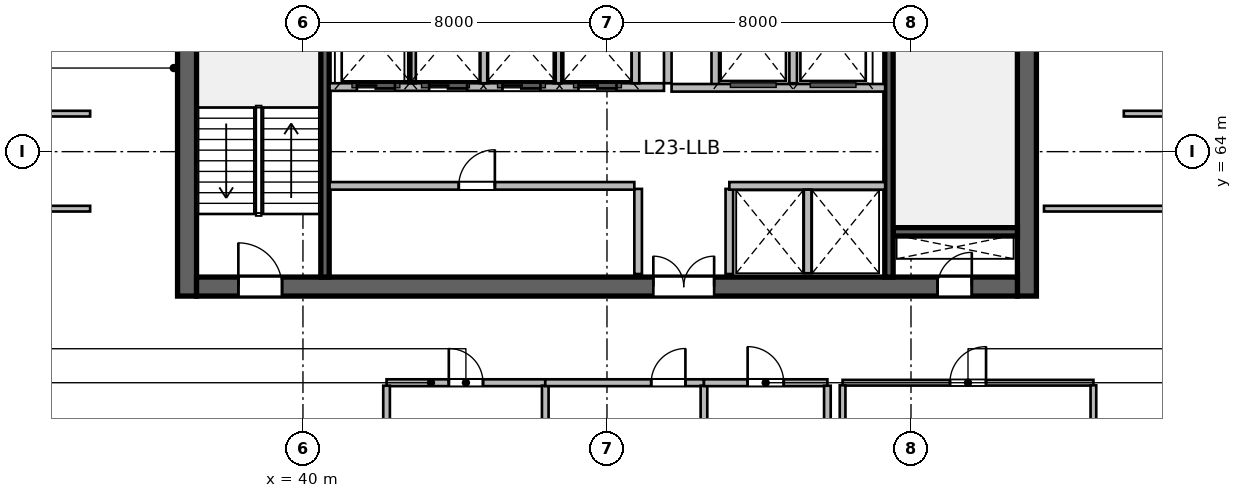
"""IFC4 building model, lengths in metres.
Left out: names, types, materials, properties, quantities, classifications, styles, units other than length and angle.
Written with IfcOpenShell. Run it as: python <this file> out.ifc"""

import sys

from ifc_helpers import new_model, si_unit, direction, frame, frame_2d, origin, place, context, subcontext, project, spatial, rectangle, extrude, source, transform, mapped, element, fill, save


model = new_model("IFC4")
c1 = context("Model", 3, precision=1e-05, world=origin(), true_north=direction((0.0, 1.0)))
c2 = subcontext(c1, "Body", "Model", "MODEL_VIEW")
j1 = project(units=[si_unit("LENGTHUNIT", "METRE"), si_unit("PLANEANGLEUNIT", "RADIAN")], contexts=[c1])
p1 = place(None, origin())
s1 = spatial("IfcSite", under=j1, at=p1, CompositionType="ELEMENT")
p2 = place(p1, origin())
s2 = spatial("IfcBuilding", under=s1, at=p2, CompositionType="ELEMENT")
p3 = place(p2, frame((0.0, 0.0, 99.9)))
s3 = spatial("IfcBuildingStorey", under=s2, at=p3, CompositionType="ELEMENT", Elevation=99.9)
m1 = source(origin(), c2, "Body", "SweptSolid", [
    extrude(rectangle(XDim=12.0, YDim=0.5, at=frame_2d((6.0, 0.0))), origin(), (0.0, 0.0, 1.0), 3.9),
])
for number, where, z_axis, x_axis in (
    (1, (36.95, 60.2, 0.0), (0.0, 0.0, 1.0), (0.0, 1.0, 0.0)),
    (2, (59.05, 60.2, 0.0), (0.0, 0.0, 1.0), (0.0, 1.0, 0.0)),
):
    element("IfcWall", number, at=place(p3, frame(where, z_axis=z_axis, x_axis=x_axis)), inside=s3, PredefinedType="SHEAR", context=c2, shape_type="MappedRepresentation", body=[
        mapped(m1, transform((0.0, 0.0, 0.0), scale=1.0)),
    ])
m2 = source(origin(), c2, "Body", "SweptSolid", [
    extrude(rectangle(XDim=21.6, YDim=0.5, at=frame_2d((10.8, 0.0))), origin(), (0.0, 0.0, 1.0), 3.9),
])
p4 = place(p3, frame((37.2, 60.45, 0.0), z_axis=(0.0, 0.0, 1.0), x_axis=(1.0, 0.0, 0.0)))
e3 = element("IfcWall", 3, at=p4, inside=s3, PredefinedType="SHEAR", context=c2, shape_type="MappedRepresentation", body=[
    mapped(m2, transform((0.0, 0.0, 0.0), scale=1.0)),
])
p5 = place(p4, frame((1.1, 0.0, 0.0)))
e4 = element("IfcOpeningElement", 4, at=p5, cuts=e3, PredefinedType="OPENING", context=c2, shape_type="SweptSolid", body=[
    extrude(rectangle(XDim=1.15, YDim=2.15, at=frame_2d((0.575, 1.075))), frame((0.0, 0.26, 0.0), z_axis=(0.0, -1.0, 0.0), x_axis=(1.0, 0.0, 0.0)), (0.0, 0.0, 1.0), 0.52),
])
p6 = place(p4, frame((19.5, 0.0, 0.0)))
e5 = element("IfcOpeningElement", 5, at=p6, cuts=e3, PredefinedType="OPENING", context=c2, shape_type="SweptSolid", body=[
    extrude(rectangle(XDim=0.9, YDim=2.1, at=frame_2d((0.45, 1.05))), frame((0.0, 0.26, 0.0), z_axis=(0.0, -1.0, 0.0), x_axis=(1.0, 0.0, 0.0)), (0.0, 0.0, 1.0), 0.52),
])
p7 = place(p4, frame((12.02, 0.0, 0.0)))
e6 = element("IfcOpeningElement", 6, at=p7, cuts=e3, PredefinedType="OPENING", context=c2, shape_type="SweptSolid", body=[
    extrude(rectangle(XDim=1.6, YDim=2.15, at=frame_2d((0.8, 1.075))), frame((0.0, 0.26, 0.0), z_axis=(0.0, -1.0, 0.0), x_axis=(1.0, 0.0, 0.0)), (0.0, 0.0, 1.0), 0.52),
])
m3 = source(origin(), c2, "Body", "SweptSolid", [
    extrude(rectangle(XDim=3.27, YDim=0.22, at=frame_2d((1.635, 0.0))), origin(), (0.0, 0.0, 1.0), 3.9),
])
p8 = place(p3, frame((55.53, 61.89, 0.0), z_axis=(0.0, 0.0, 1.0), x_axis=(1.0, 0.0, 0.0)))
e7 = element("IfcWall", 7, at=p8, inside=s3, PredefinedType="SHEAR", context=c2, shape_type="MappedRepresentation", body=[
    mapped(m3, transform((0.0, 0.0, 0.0), scale=1.0)),
])
m4 = source(origin(), c2, "Body", "SweptSolid", [
    extrude(rectangle(XDim=11.0, YDim=0.22, at=frame_2d((5.5, 0.0))), origin(), (0.0, 0.0, 1.0), 3.9),
])
p9 = place(p3, frame((40.58, 60.7, 0.0), z_axis=(0.0, 0.0, 1.0), x_axis=(0.0, 1.0, 0.0)))
e8 = element("IfcWall", 8, at=p9, inside=s3, PredefinedType="SHEAR", context=c2, shape_type="MappedRepresentation", body=[
    mapped(m4, transform((0.0, 0.0, 0.0), scale=1.0)),
])
p10 = place(p3, frame((55.42, 60.7, 0.0), z_axis=(0.0, 0.0, 1.0), x_axis=(0.0, 1.0, 0.0)))
e9 = element("IfcWall", 9, at=p10, inside=s3, PredefinedType="SHEAR", context=c2, shape_type="MappedRepresentation", body=[
    mapped(m4, transform((0.0, 0.0, 0.0), scale=1.0)),
])
p11 = place(p10, frame((9.545, 0.0, 0.0)))
e10 = element("IfcOpeningElement", 10, at=p11, cuts=e9, PredefinedType="OPENING", context=c2, shape_type="SweptSolid", body=[
    extrude(rectangle(XDim=1.15, YDim=2.15, at=frame_2d((0.575, 1.075))), frame((0.0, 0.12, 0.0), z_axis=(0.0, -1.0, 0.0), x_axis=(1.0, 0.0, 0.0)), (0.0, 0.0, 1.0), 0.24),
])
m5 = source(origin(), c2, "Body", "SweptSolid", [
    extrude(rectangle(XDim=2.24, YDim=0.2, at=frame_2d((1.12, 0.0))), origin(), (0.0, 0.0, 1.0), 3.65),
])
for number, where, z_axis, x_axis in (
    (11, (48.82, 60.78, 0.0), (0.0, 0.0, 1.0), (0.0, 1.0, 0.0)),
    (12, (51.22, 60.78, 0.0), (0.0, 0.0, 1.0), (0.0, 1.0, 0.0)),
):
    element("IfcWall", number, at=place(p3, frame(where, z_axis=z_axis, x_axis=x_axis)), inside=s3, PredefinedType="SOLIDWALL", context=c2, shape_type="MappedRepresentation", body=[
        mapped(m5, transform((0.0, 0.0, 0.0), scale=1.0)),
    ])
m6 = source(origin(), c2, "Body", "SweptSolid", [
    extrude(rectangle(XDim=5.8, YDim=0.2, at=frame_2d((2.9, 0.0))), origin(), (0.0, 0.0, 1.0), 3.65),
])
p12 = place(p3, frame((49.6, 65.8, 0.0), z_axis=(0.0, 0.0, 1.0), x_axis=(0.0, 1.0, 0.0)))
e13 = element("IfcWall", 13, at=p12, inside=s3, PredefinedType="SOLIDWALL", context=c2, shape_type="MappedRepresentation", body=[
    mapped(m6, transform((0.0, 0.0, 0.0), scale=1.0)),
])
m7 = source(origin(), c2, "Body", "SweptSolid", [
    extrude(rectangle(XDim=2.58, YDim=0.2, at=frame_2d((1.29, 0.0))), origin(), (0.0, 0.0, 1.0), 3.65),
])
p13 = place(p3, frame((50.85, 65.68, 0.0), z_axis=(0.0, 0.0, 1.0), x_axis=(0.0, 1.0, 0.0)))
e14 = element("IfcWall", 14, at=p13, inside=s3, PredefinedType="SOLIDWALL", context=c2, shape_type="MappedRepresentation", body=[
    mapped(m7, transform((0.0, 0.0, 0.0), scale=1.0)),
])
m8 = source(origin(), c2, "Body", "SweptSolid", [
    extrude(rectangle(XDim=2.4, YDim=0.2, at=frame_2d((1.2, 0.0))), origin(), (0.0, 0.0, 1.0), 3.65),
])
p14 = place(p3, frame((52.9, 65.8, 0.0), z_axis=(0.0, 0.0, 1.0), x_axis=(0.0, 1.0, 0.0)))
e15 = element("IfcWall", 15, at=p14, inside=s3, PredefinedType="SOLIDWALL", context=c2, shape_type="MappedRepresentation", body=[
    mapped(m8, transform((0.0, 0.0, 0.0), scale=1.0)),
])
m9 = source(origin(), c2, "Body", "SweptSolid", [
    extrude(rectangle(XDim=5.62, YDim=0.2, at=frame_2d((2.81, 0.0))), origin(), (0.0, 0.0, 1.0), 3.65),
])
p15 = place(p3, frame((49.7, 65.68, 0.0), z_axis=(0.0, 0.0, 1.0), x_axis=(1.0, 0.0, 0.0)))
e16 = element("IfcWall", 16, at=p15, inside=s3, PredefinedType="SOLIDWALL", context=c2, shape_type="MappedRepresentation", body=[
    mapped(m9, transform((0.0, 0.0, 0.0), scale=1.0)),
])
m10 = source(origin(), c2, "Body", "SweptSolid", [
    extrude(rectangle(XDim=8.02, YDim=0.2, at=frame_2d((4.01, 0.0))), origin(), (0.0, 0.0, 1.0), 3.65),
])
p16 = place(p3, frame((40.7, 63.1, 0.0), z_axis=(0.0, 0.0, 1.0), x_axis=(1.0, 0.0, 0.0)))
e17 = element("IfcWall", 17, at=p16, inside=s3, PredefinedType="SOLIDWALL", context=c2, shape_type="MappedRepresentation", body=[
    mapped(m10, transform((0.0, 0.0, 0.0), scale=1.0)),
])
p17 = place(p16, frame((3.4, 0.0, 0.0)))
e18 = element("IfcOpeningElement", 18, at=p17, cuts=e17, PredefinedType="OPENING", context=c2, shape_type="SweptSolid", body=[
    extrude(rectangle(XDim=0.95, YDim=2.15, at=frame_2d((0.475, 1.075))), frame((0.0, 0.11, 0.0), z_axis=(0.0, -1.0, 0.0), x_axis=(1.0, 0.0, 0.0)), (0.0, 0.0, 1.0), 0.22),
])
m11 = source(origin(), c2, "Body", "SweptSolid", [
    extrude(rectangle(XDim=4.1, YDim=0.2, at=frame_2d((2.05, 0.0))), origin(), (0.0, 0.0, 1.0), 3.65),
])
p18 = place(p3, frame((51.22, 63.1, 0.0), z_axis=(0.0, 0.0, 1.0), x_axis=(1.0, 0.0, 0.0)))
e19 = element("IfcWall", 19, at=p18, inside=s3, PredefinedType="SOLIDWALL", context=c2, shape_type="MappedRepresentation", body=[
    mapped(m11, transform((0.0, 0.0, 0.0), scale=1.0)),
])
m12 = source(origin(), c2, "Body", "SweptSolid", [
    extrude(rectangle(XDim=2.2, YDim=0.2, at=frame_2d((1.1, 0.0))), origin(), (0.0, 0.0, 1.0), 3.65),
])
p19 = place(p3, frame((53.28, 60.8, 0.0), z_axis=(0.0, 0.0, 1.0), x_axis=(0.0, 1.0, 0.0)))
e20 = element("IfcWall", 20, at=p19, inside=s3, PredefinedType="SOLIDWALL", context=c2, shape_type="MappedRepresentation", body=[
    mapped(m12, transform((0.0, 0.0, 0.0), scale=1.0)),
])
m13 = source(origin(), c2, "Body", "SweptSolid", [
    extrude(rectangle(XDim=8.8, YDim=0.2, at=frame_2d((4.4, 0.0))), origin(), (0.0, 0.0, 1.0), 3.65),
])
p20 = place(p3, frame((40.7, 65.7, 0.0), z_axis=(0.0, 0.0, 1.0), x_axis=(1.0, 0.0, 0.0)))
e21 = element("IfcWall", 21, at=p20, inside=s3, PredefinedType="SOLIDWALL", context=c2, shape_type="MappedRepresentation", body=[
    mapped(m13, transform((0.0, 0.0, 0.0), scale=1.0)),
])
p21 = place(p20, frame((0.72, 0.0, 0.0)))
e22 = element("IfcOpeningElement", 22, at=p21, cuts=e21, PredefinedType="OPENING", context=c2, shape_type="SweptSolid", body=[
    extrude(rectangle(XDim=1.0, YDim=2.15, at=frame_2d((0.5, 1.075))), frame((0.0, 0.11, 0.0), z_axis=(0.0, -1.0, 0.0), x_axis=(1.0, 0.0, 0.0)), (0.0, 0.0, 1.0), 0.22),
])
p22 = place(p20, frame((2.62, 0.0, 0.0)))
e23 = element("IfcOpeningElement", 23, at=p22, cuts=e21, PredefinedType="OPENING", context=c2, shape_type="SweptSolid", body=[
    extrude(rectangle(XDim=1.0, YDim=2.15, at=frame_2d((0.5, 1.075))), frame((0.0, 0.11, 0.0), z_axis=(0.0, -1.0, 0.0), x_axis=(1.0, 0.0, 0.0)), (0.0, 0.0, 1.0), 0.22),
])
p23 = place(p20, frame((4.55, 0.0, 0.0)))
e24 = element("IfcOpeningElement", 24, at=p23, cuts=e21, PredefinedType="OPENING", context=c2, shape_type="SweptSolid", body=[
    extrude(rectangle(XDim=1.0, YDim=2.15, at=frame_2d((0.5, 1.075))), frame((0.0, 0.11, 0.0), z_axis=(0.0, -1.0, 0.0), x_axis=(1.0, 0.0, 0.0)), (0.0, 0.0, 1.0), 0.22),
])
p24 = place(p20, frame((6.55, 0.0, 0.0)))
e25 = element("IfcOpeningElement", 25, at=p24, cuts=e21, PredefinedType="OPENING", context=c2, shape_type="SweptSolid", body=[
    extrude(rectangle(XDim=1.0, YDim=2.15, at=frame_2d((0.5, 1.075))), frame((0.0, 0.11, 0.0), z_axis=(0.0, -1.0, 0.0), x_axis=(1.0, 0.0, 0.0)), (0.0, 0.0, 1.0), 0.22),
])
for number, where, z_axis, x_axis in (
    (26, (48.75, 65.8, 0.0), (0.0, 0.0, 1.0), (0.0, 1.0, 0.0)),
    (27, (42.87, 65.8, 0.0), (0.0, 0.0, 1.0), (0.0, 1.0, 0.0)),
    (28, (44.77, 65.8, 0.0), (0.0, 0.0, 1.0), (0.0, 1.0, 0.0)),
    (29, (46.7, 65.8, 0.0), (0.0, 0.0, 1.0), (0.0, 1.0, 0.0)),
):
    element("IfcWall", number, at=place(p3, frame(where, z_axis=z_axis, x_axis=x_axis)), inside=s3, PredefinedType="SOLIDWALL", context=c2, shape_type="MappedRepresentation", body=[
        mapped(m8, transform((0.0, 0.0, 0.0), scale=1.0)),
    ])
m14 = source(origin(), c2, "Body", "SweptSolid", [
    extrude(rectangle(XDim=4.176, YDim=0.18, at=frame_2d((2.088, 0.0))), origin(), (0.0, 0.0, 1.0), 3.65),
])
p25 = place(p3, frame((42.2, 57.92, 0.0), z_axis=(0.0, 0.0, 1.0), x_axis=(1.0, 0.0, 0.0)))
e30 = element("IfcWall", 30, at=p25, inside=s3, PredefinedType="PLUMBINGWALL", context=c2, shape_type="MappedRepresentation", body=[
    mapped(m14, transform((0.0, 0.0, 0.0), scale=1.0)),
])
p26 = place(p25, frame((1.638, 0.0, 0.0)))
e31 = element("IfcOpeningElement", 31, at=p26, cuts=e30, PredefinedType="OPENING", context=c2, shape_type="SweptSolid", body=[
    extrude(rectangle(XDim=0.9, YDim=2.08, at=frame_2d((0.45, 1.04))), frame((0.0, 0.1, 0.0), z_axis=(0.0, -1.0, 0.0), x_axis=(1.0, 0.0, 0.0)), (0.0, 0.0, 1.0), 0.2),
])
m15 = source(origin(), c2, "Body", "SweptSolid", [
    extrude(rectangle(XDim=3.763, YDim=0.175, at=frame_2d((1.881, 0.0))), origin(), (0.0, 0.0, 1.0), 3.65),
])
for number, where, z_axis, x_axis in (
    (32, (42.2, 54.079, 0.0), (0.0, 0.0, 1.0), (0.0, 1.0, 0.0)),
    (33, (46.376, 54.079, 0.0), (0.0, 0.0, 1.0), (0.0, 1.0, 0.0)),
):
    element("IfcWall", number, at=place(p3, frame(where, z_axis=z_axis, x_axis=x_axis)), inside=s3, PredefinedType="PARTITIONING", context=c2, shape_type="MappedRepresentation", body=[
        mapped(m15, transform((0.0, 0.0, 0.0), scale=1.0)),
    ])
p27 = place(p3, frame((46.376, 57.92, 0.0), z_axis=(0.0, 0.0, 1.0), x_axis=(1.0, 0.0, 0.0)))
e34 = element("IfcWall", 34, at=p27, inside=s3, PredefinedType="PLUMBINGWALL", context=c2, shape_type="MappedRepresentation", body=[
    mapped(m14, transform((0.0, 0.0, 0.0), scale=1.0)),
])
p28 = place(p27, frame((2.788, 0.0, 0.0)))
e35 = element("IfcOpeningElement", 35, at=p28, cuts=e34, PredefinedType="OPENING", context=c2, shape_type="SweptSolid", body=[
    extrude(rectangle(XDim=0.9, YDim=2.08, at=frame_2d((0.45, 1.04))), frame((0.0, 0.1, 0.0), z_axis=(0.0, -1.0, 0.0), x_axis=(1.0, 0.0, 0.0)), (0.0, 0.0, 1.0), 0.2),
])
p29 = place(p3, frame((50.552, 54.079, 0.0), z_axis=(0.0, 0.0, 1.0), x_axis=(0.0, 1.0, 0.0)))
e36 = element("IfcWall", 36, at=p29, inside=s3, PredefinedType="PARTITIONING", context=c2, shape_type="MappedRepresentation", body=[
    mapped(m15, transform((0.0, 0.0, 0.0), scale=1.0)),
])
m16 = source(origin(), c2, "Body", "SweptSolid", [
    extrude(rectangle(XDim=3.248, YDim=0.18, at=frame_2d((1.624, 0.0))), origin(), (0.0, 0.0, 1.0), 3.65),
])
p30 = place(p3, frame((50.552, 57.92, 0.0), z_axis=(0.0, 0.0, 1.0), x_axis=(1.0, 0.0, 0.0)))
e37 = element("IfcWall", 37, at=p30, inside=s3, PredefinedType="PLUMBINGWALL", context=c2, shape_type="MappedRepresentation", body=[
    mapped(m16, transform((0.0, 0.0, 0.0), scale=1.0)),
])
p31 = place(p30, frame((1.149, 0.0, 0.0)))
e38 = element("IfcOpeningElement", 38, at=p31, cuts=e37, PredefinedType="OPENING", context=c2, shape_type="SweptSolid", body=[
    extrude(rectangle(XDim=0.95, YDim=2.12, at=frame_2d((0.475, 1.06))), frame((0.0, 0.1, 0.0), z_axis=(0.0, -1.0, 0.0), x_axis=(1.0, 0.0, 0.0)), (0.0, 0.0, 1.0), 0.2),
])
p32 = place(p3, frame((53.8, 54.079, 0.0), z_axis=(0.0, 0.0, 1.0), x_axis=(0.0, 1.0, 0.0)))
e39 = element("IfcWall", 39, at=p32, inside=s3, PredefinedType="PARTITIONING", context=c2, shape_type="MappedRepresentation", body=[
    mapped(m15, transform((0.0, 0.0, 0.0), scale=1.0)),
])
m17 = source(origin(), c2, "Body", "SweptSolid", [
    extrude(rectangle(XDim=6.6, YDim=0.15, at=frame_2d((3.3, 0.0))), origin(), (0.0, 0.0, 1.0), 3.65),
])
p33 = place(p3, frame((54.2, 57.92, 0.0), z_axis=(0.0, 0.0, 1.0), x_axis=(1.0, 0.0, 0.0)))
e40 = element("IfcWall", 40, at=p33, inside=s3, PredefinedType="PARTITIONING", context=c2, shape_type="MappedRepresentation", body=[
    mapped(m17, transform((0.0, 0.0, 0.0), scale=1.0)),
])
p34 = place(p33, frame((2.825, 0.0, 0.0)))
e41 = element("IfcOpeningElement", 41, at=p34, cuts=e40, PredefinedType="OPENING", context=c2, shape_type="SweptSolid", body=[
    extrude(rectangle(XDim=0.95, YDim=2.1, at=frame_2d((0.475, 1.05))), frame((0.0, 0.085, 0.0), z_axis=(0.0, -1.0, 0.0), x_axis=(1.0, 0.0, 0.0)), (0.0, 0.0, 1.0), 0.17),
])
m18 = source(origin(), c2, "Body", "SweptSolid", [
    extrude(rectangle(XDim=3.785, YDim=0.15, at=frame_2d((1.893, 0.0))), origin(), (0.0, 0.0, 1.0), 3.65),
])
for number, where, z_axis, x_axis in (
    (42, (54.2, 54.067, 0.0), (0.0, 0.0, 1.0), (0.0, 1.0, 0.0)),
    (43, (60.8, 54.067, 0.0), (0.0, 0.0, 1.0), (0.0, 1.0, 0.0)),
):
    element("IfcWall", number, at=place(p3, frame(where, z_axis=z_axis, x_axis=x_axis)), inside=s3, PredefinedType="PARTITIONING", context=c2, shape_type="MappedRepresentation", body=[
        mapped(m18, transform((0.0, 0.0, 0.0), scale=1.0)),
    ])
m19 = source(origin(), c2, "Body", "SweptSolid", [
    extrude(rectangle(XDim=2.66, YDim=0.15, at=frame_2d((1.33, 0.0))), origin(), (0.0, 0.0, 1.0), 3.65),
])
for number, where, z_axis, x_axis in (
    (44, (31.74, 62.5, 0.0), (0.0, 0.0, 1.0), (1.0, 0.0, 0.0)),
    (45, (31.74, 65.0, 0.0), (0.0, 0.0, 1.0), (1.0, 0.0, 0.0)),
):
    element("IfcWall", number, at=place(p3, frame(where, z_axis=z_axis, x_axis=x_axis)), inside=s3, PredefinedType="PARTITIONING", context=c2, shape_type="MappedRepresentation", body=[
        mapped(m19, transform((0.0, 0.0, 0.0), scale=1.0)),
    ])
m20 = source(origin(), c2, "Body", "SweptSolid", [
    extrude(rectangle(XDim=4.76, YDim=0.15, at=frame_2d((2.38, 0.0))), origin(), (0.0, 0.0, 1.0), 3.65),
])
p35 = place(p3, frame((59.5, 62.5, 0.0), z_axis=(0.0, 0.0, 1.0), x_axis=(1.0, 0.0, 0.0)))
e46 = element("IfcWall", 46, at=p35, inside=s3, PredefinedType="PARTITIONING", context=c2, shape_type="MappedRepresentation", body=[
    mapped(m20, transform((0.0, 0.0, 0.0), scale=1.0)),
])
p36 = place(p3, frame((61.6, 65.0, 0.0), z_axis=(0.0, 0.0, 1.0), x_axis=(1.0, 0.0, 0.0)))
e47 = element("IfcWall", 47, at=p36, inside=s3, PredefinedType="PARTITIONING", context=c2, shape_type="MappedRepresentation", body=[
    mapped(m19, transform((0.0, 0.0, 0.0), scale=1.0)),
])
m21 = source(origin(), c2, "Body", "SweptSolid", [
    extrude(rectangle(XDim=1.15, YDim=2.15, at=frame_2d((0.575, 1.075))), frame((0.0, 0.025, 0.0), z_axis=(0.0, -1.0, 0.0), x_axis=(1.0, 0.0, 0.0)), (0.0, 0.0, 1.0), 0.05),
])
p37 = place(p5, origin())
e48 = element("IfcDoor", 48, at=p37, inside=s3, OperationType="SINGLE_SWING_LEFT", PredefinedType="DOOR", context=c2, shape_type="MappedRepresentation", body=[
    mapped(m21, transform((0.0, 0.0, 0.0), scale=1.0)),
])
fill(e4, e48)
m22 = source(origin(), c2, "Body", "SweptSolid", [
    extrude(rectangle(XDim=0.9, YDim=2.1, at=frame_2d((0.45, 1.05))), frame((0.0, 0.025, 0.0), z_axis=(0.0, -1.0, 0.0), x_axis=(1.0, 0.0, 0.0)), (0.0, 0.0, 1.0), 0.05),
])
p38 = place(p6, origin())
e49 = element("IfcDoor", 49, at=p38, inside=s3, OperationType="SINGLE_SWING_RIGHT", PredefinedType="DOOR", context=c2, shape_type="MappedRepresentation", body=[
    mapped(m22, transform((0.0, 0.0, 0.0), scale=1.0)),
])
fill(e5, e49)
m23 = source(origin(), c2, "Body", "SweptSolid", [
    extrude(rectangle(XDim=1.6, YDim=2.15, at=frame_2d((0.8, 1.075))), frame((0.0, 0.025, 0.0), z_axis=(0.0, -1.0, 0.0), x_axis=(1.0, 0.0, 0.0)), (0.0, 0.0, 1.0), 0.05),
])
p39 = place(p7, origin())
e50 = element("IfcDoor", 50, at=p39, inside=s3, OperationType="DOUBLE_DOOR_SINGLE_SWING", PredefinedType="DOOR", context=c2, shape_type="MappedRepresentation", body=[
    mapped(m23, transform((0.0, 0.0, 0.0), scale=1.0)),
])
fill(e6, e50)
m24 = source(origin(), c2, "Body", "SweptSolid", [
    extrude(rectangle(XDim=0.95, YDim=2.15, at=frame_2d((0.475, 1.075))), frame((0.0, 0.025, 0.0), z_axis=(0.0, -1.0, 0.0), x_axis=(1.0, 0.0, 0.0)), (0.0, 0.0, 1.0), 0.05),
])
p40 = place(p17, origin())
e51 = element("IfcDoor", 51, at=p40, inside=s3, OperationType="SINGLE_SWING_RIGHT", PredefinedType="DOOR", context=c2, shape_type="MappedRepresentation", body=[
    mapped(m24, transform((0.0, 0.0, 0.0), scale=1.0)),
])
fill(e18, e51)
m25 = source(origin(), c2, "Body", "SweptSolid", [
    extrude(rectangle(XDim=1.0, YDim=2.15, at=frame_2d((0.5, 1.075))), frame((0.0, 0.025, 0.0), z_axis=(0.0, -1.0, 0.0), x_axis=(1.0, 0.0, 0.0)), (0.0, 0.0, 1.0), 0.05),
])
p41 = place(p21, origin())
e52 = element("IfcDoor", 52, at=p41, inside=s3, OperationType="DOUBLE_DOOR_SLIDING", PredefinedType="DOOR", context=c2, shape_type="MappedRepresentation", body=[
    mapped(m25, transform((0.0, 0.0, 0.0), scale=1.0)),
])
fill(e22, e52)
p42 = place(p22, origin())
e53 = element("IfcDoor", 53, at=p42, inside=s3, OperationType="DOUBLE_DOOR_SLIDING", PredefinedType="DOOR", context=c2, shape_type="MappedRepresentation", body=[
    mapped(m25, transform((0.0, 0.0, 0.0), scale=1.0)),
])
fill(e23, e53)
p43 = place(p23, origin())
e54 = element("IfcDoor", 54, at=p43, inside=s3, OperationType="DOUBLE_DOOR_SLIDING", PredefinedType="DOOR", context=c2, shape_type="MappedRepresentation", body=[
    mapped(m25, transform((0.0, 0.0, 0.0), scale=1.0)),
])
fill(e24, e54)
p44 = place(p24, origin())
e55 = element("IfcDoor", 55, at=p44, inside=s3, OperationType="DOUBLE_DOOR_SLIDING", PredefinedType="DOOR", context=c2, shape_type="MappedRepresentation", body=[
    mapped(m25, transform((0.0, 0.0, 0.0), scale=1.0)),
])
fill(e25, e55)
m26 = source(origin(), c2, "Body", "SweptSolid", [
    extrude(rectangle(XDim=0.9, YDim=2.08, at=frame_2d((0.45, 1.04))), frame((0.0, 0.025, 0.0), z_axis=(0.0, -1.0, 0.0), x_axis=(1.0, 0.0, 0.0)), (0.0, 0.0, 1.0), 0.05),
])
p45 = place(p26, origin())
e56 = element("IfcDoor", 56, at=p45, inside=s3, OperationType="SINGLE_SWING_LEFT", PredefinedType="DOOR", context=c2, shape_type="MappedRepresentation", body=[
    mapped(m26, transform((0.0, 0.0, 0.0), scale=1.0)),
])
fill(e31, e56)
p46 = place(p28, origin())
e57 = element("IfcDoor", 57, at=p46, inside=s3, OperationType="SINGLE_SWING_RIGHT", PredefinedType="DOOR", context=c2, shape_type="MappedRepresentation", body=[
    mapped(m26, transform((0.0, 0.0, 0.0), scale=1.0)),
])
fill(e35, e57)
m27 = source(origin(), c2, "Body", "SweptSolid", [
    extrude(rectangle(XDim=0.95, YDim=2.12, at=frame_2d((0.475, 1.06))), frame((0.0, 0.025, 0.0), z_axis=(0.0, -1.0, 0.0), x_axis=(1.0, 0.0, 0.0)), (0.0, 0.0, 1.0), 0.05),
])
p47 = place(p31, origin())
e58 = element("IfcDoor", 58, at=p47, inside=s3, OperationType="SINGLE_SWING_LEFT", PredefinedType="DOOR", context=c2, shape_type="MappedRepresentation", body=[
    mapped(m27, transform((0.0, 0.0, 0.0), scale=1.0)),
])
fill(e38, e58)
m28 = source(origin(), c2, "Body", "SweptSolid", [
    extrude(rectangle(XDim=0.95, YDim=2.1, at=frame_2d((0.475, 1.05))), frame((0.0, 0.025, 0.0), z_axis=(0.0, -1.0, 0.0), x_axis=(1.0, 0.0, 0.0)), (0.0, 0.0, 1.0), 0.05),
])
p48 = place(p34, origin())
e59 = element("IfcDoor", 59, at=p48, inside=s3, OperationType="SINGLE_SWING_RIGHT", PredefinedType="DOOR", context=c2, shape_type="MappedRepresentation", body=[
    mapped(m28, transform((0.0, 0.0, 0.0), scale=1.0)),
])
fill(e41, e59)
save(model, sys.argv[1])
